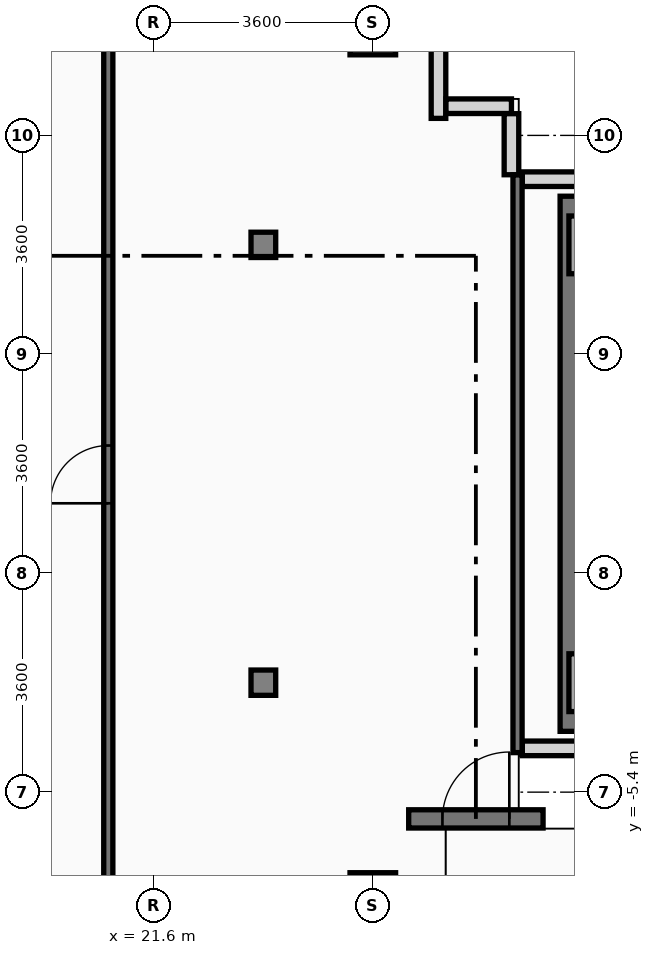
"""IFC4 building model, lengths in metres.
Left out: names, types, materials, properties, quantities, classifications, styles, units other than length and angle.
Written with IfcOpenShell. Run it as: python <this file> out.ifc"""

import sys

from ifc_helpers import new_model, si_unit, direction, frame, frame_2d, origin, origin_2d, place, context, subcontext, project, spatial, rectangle, i_section, extrude, source, transform, mapped, element, fill, save


model = new_model("IFC4")
c1 = context("Model", 3, precision=1e-05, world=origin(), true_north=direction((0.0, 1.0)))
c2 = subcontext(c1, "Body", "Model", "MODEL_VIEW")
j1 = project(units=[si_unit("LENGTHUNIT", "METRE"), si_unit("PLANEANGLEUNIT", "RADIAN")], contexts=[c1])
p1 = place(None, origin())
s1 = spatial("IfcSite", under=j1, at=p1, CompositionType="ELEMENT")
p2 = place(p1, origin())
s2 = spatial("IfcBuilding", under=s1, at=p2, CompositionType="ELEMENT")
p3 = place(p2, frame((0.0, 0.0, 25.2)))
s3 = spatial("IfcBuildingStorey", under=s2, at=p3, CompositionType="ELEMENT", Elevation=25.2)
m1 = source(origin(), c2, "Body", "SweptSolid", [
    extrude(i_section(OverallWidth=0.406, OverallDepth=0.416, WebThickness=0.024, FlangeThickness=0.039, at=origin_2d()), origin(), (0.0, 0.0, 1.0), 5.2),
])
for number, where, z_axis, x_axis in (
    (1, (23.4, -3.6, 0.0), (0.0, 0.0, 1.0), (1.0, 0.0, 0.0)),
    (2, (23.4, 3.6, 0.0), (0.0, 0.0, 1.0), (1.0, 0.0, 0.0)),
):
    element("IfcColumn", number, at=place(p3, frame(where, z_axis=z_axis, x_axis=x_axis)), inside=s3, PredefinedType="COLUMN", context=c2, shape_type="MappedRepresentation", body=[
        mapped(m1, transform((0.0, 0.0, 0.0), x_axis=(1.0, 0.0, 0.0), y_axis=(0.0, 1.0, 0.0), z_axis=(0.0, 0.0, 1.0), scale=1.0)),
    ])
m2 = source(origin(), c2, "Body", "SweptSolid", [
    extrude(rectangle(XDim=0.75, YDim=0.95, at=origin_2d()), origin(), (0.0, 0.0, 1.0), 5.2),
])
for number, where, z_axis, x_axis in (
    (3, (25.2, -7.2, 0.0), (0.0, 0.0, 1.0), (1.0, 0.0, 0.0)),
    (4, (25.2, 7.2, 0.0), (0.0, 0.0, 1.0), (1.0, 0.0, 0.0)),
    (5, (28.8, -3.6, 0.0), (0.0, 0.0, 1.0), (1.0, 0.0, 0.0)),
    (6, (28.8, 3.6, 0.0), (0.0, 0.0, 1.0), (1.0, 0.0, 0.0)),
):
    element("IfcColumn", number, at=place(p3, frame(where, z_axis=z_axis, x_axis=x_axis)), inside=s3, PredefinedType="COLUMN", context=c2, shape_type="MappedRepresentation", body=[
        mapped(m2, transform((0.0, 0.0, 0.0), x_axis=(1.0, 0.0, 0.0), y_axis=(0.0, 1.0, 0.0), z_axis=(0.0, 0.0, 1.0), scale=1.0)),
    ])
p4 = place(p3, frame((28.45, -4.4, 0.0), z_axis=(0.0, 0.0, 1.0), x_axis=(0.0, 1.0, 0.0)))
e7 = element("IfcWall", 7, at=p4, inside=s3, PredefinedType="SOLIDWALL", context=c2, shape_type="SweptSolid", body=[
    extrude(rectangle(XDim=8.8, YDim=0.34, at=frame_2d((4.4, 0.0))), origin(), (0.0, 0.0, 1.0), 4.386),
])
p5 = place(p3, frame((25.79, -5.84, 0.0), z_axis=(0.0, 0.0, 1.0), x_axis=(1.0, 0.0, 0.0)))
e8 = element("IfcWall", 8, at=p5, inside=s3, PredefinedType="SOLIDWALL", context=c2, shape_type="SweptSolid", body=[
    extrude(rectangle(XDim=2.21, YDim=0.3, at=frame_2d((1.105, 0.0))), origin(), (0.0, 0.0, 1.0), 3.4),
])
p6 = place(p5, frame((0.555, 0.0, 0.0)))
e9 = element("IfcOpeningElement", 9, at=p6, cuts=e8, PredefinedType="OPENING", context=c2, shape_type="SweptSolid", body=[
    extrude(rectangle(XDim=1.1, YDim=2.3, at=frame_2d((0.55, 1.15))), frame((0.0, 0.16, 0.0), z_axis=(0.0, -1.0, 0.0), x_axis=(1.0, 0.0, 0.0)), (0.0, 0.0, 1.0), 0.32),
])
p7 = place(p3, frame((28.68, -4.68, 0.0), z_axis=(0.0, 0.0, 1.0), x_axis=(-1.0, 0.0, 0.0)))
e10 = element("IfcWall", 10, at=p7, inside=s3, PredefinedType="PARAPET", context=c2, shape_type="SweptSolid", body=[
    extrude(rectangle(XDim=1.022, YDim=0.24, at=frame_2d((0.511, 0.0))), origin(), (0.0, 0.0, 1.0), 1.15),
])
p8 = place(p3, frame((26.28, 6.957, 0.0), z_axis=(0.0, 0.0, 1.0), x_axis=(0.0, -1.0, 0.0)))
e11 = element("IfcWall", 11, at=p8, inside=s3, PredefinedType="PARAPET", context=c2, shape_type="SweptSolid", body=[
    extrude(rectangle(XDim=1.277, YDim=0.24, at=frame_2d((0.639, 0.0))), origin(), (0.0, 0.0, 1.0), 1.15),
])
p9 = place(p3, frame((26.403, 5.88, 0.0), z_axis=(0.0, 0.0, 1.0), x_axis=(1.0, 0.0, 0.0)))
e12 = element("IfcWall", 12, at=p9, inside=s3, PredefinedType="PARAPET", context=c2, shape_type="SweptSolid", body=[
    extrude(rectangle(XDim=1.077, YDim=0.24, at=frame_2d((0.539, 0.0))), origin(), (0.0, 0.0, 1.0), 1.15),
])
p10 = place(p3, frame((27.48, 5.757, 0.0), z_axis=(0.0, 0.0, 1.0), x_axis=(0.0, -1.0, 0.0)))
e13 = element("IfcWall", 13, at=p10, inside=s3, PredefinedType="PARAPET", context=c2, shape_type="SweptSolid", body=[
    extrude(rectangle(XDim=1.004, YDim=0.24, at=frame_2d((0.502, 0.0))), origin(), (0.0, 0.0, 1.0), 1.15),
])
p11 = place(p3, frame((27.658, 4.68, 0.0), z_axis=(0.0, 0.0, 1.0), x_axis=(1.0, 0.0, 0.0)))
e14 = element("IfcWall", 14, at=p11, inside=s3, PredefinedType="PARAPET", context=c2, shape_type="SweptSolid", body=[
    extrude(rectangle(XDim=1.022, YDim=0.24, at=frame_2d((0.511, 0.0))), origin(), (0.0, 0.0, 1.0), 1.15),
])
p12 = place(p3, frame((27.58, -4.75, 0.0), z_axis=(0.0, 0.0, 1.0), x_axis=(0.0, 1.0, 0.0)))
e15 = element("IfcWall", 15, at=p12, inside=s3, PredefinedType="PARTITIONING", context=c2, shape_type="SweptSolid", body=[
    extrude(rectangle(XDim=9.5, YDim=0.15, at=frame_2d((4.75, 0.0))), origin(), (0.0, 0.0, 1.0), 4.386),
])
p13 = place(p3, frame((20.85, -6.85, 0.0), z_axis=(0.0, 0.0, 1.0), x_axis=(0.0, 1.0, 0.0)))
e16 = element("IfcWall", 16, at=p13, inside=s3, PredefinedType="PARTITIONING", context=c2, shape_type="SweptSolid", body=[
    extrude(rectangle(XDim=13.7, YDim=0.15, at=frame_2d((6.85, 0.0))), origin(), (0.0, 0.0, 1.0), 3.4),
])
p14 = place(p13, frame((6.2, 0.0, 0.0)))
e17 = element("IfcOpeningElement", 17, at=p14, cuts=e16, PredefinedType="OPENING", context=c2, shape_type="SweptSolid", body=[
    extrude(rectangle(XDim=0.95, YDim=2.15, at=frame_2d((0.475, 1.075))), frame((0.0, 0.085, 0.0), z_axis=(0.0, -1.0, 0.0), x_axis=(1.0, 0.0, 0.0)), (0.0, 0.0, 1.0), 0.17),
])
m3 = source(origin(), c2, "Body", "SweptSolid", [
    extrude(rectangle(XDim=1.1, YDim=2.3, at=frame_2d((0.55, 1.15))), frame((0.0, 0.025, 0.0), z_axis=(0.0, -1.0, 0.0), x_axis=(1.0, 0.0, 0.0)), (0.0, 0.0, 1.0), 0.05),
])
p15 = place(p6, frame((1.1, 0.0, 0.0), z_axis=(0.0, 0.0, 1.0), x_axis=(-1.0, 0.0, 0.0)))
e18 = element("IfcDoor", 18, at=p15, inside=s3, OperationType="SINGLE_SWING_RIGHT", PredefinedType="DOOR", context=c2, shape_type="MappedRepresentation", body=[
    mapped(m3, transform((0.0, 0.0, 0.0), x_axis=(1.0, 0.0, 0.0), y_axis=(0.0, 1.0, 0.0), z_axis=(0.0, 0.0, 1.0), scale=1.0)),
])
fill(e9, e18)
m4 = source(origin(), c2, "Body", "SweptSolid", [
    extrude(rectangle(XDim=0.95, YDim=2.15, at=frame_2d((0.475, 1.075))), frame((0.0, 0.025, 0.0), z_axis=(0.0, -1.0, 0.0), x_axis=(1.0, 0.0, 0.0)), (0.0, 0.0, 1.0), 0.05),
])
p16 = place(p14, origin())
e19 = element("IfcDoor", 19, at=p16, inside=s3, OperationType="SINGLE_SWING_LEFT", PredefinedType="DOOR", context=c2, shape_type="MappedRepresentation", body=[
    mapped(m4, transform((0.0, 0.0, 0.0), x_axis=(1.0, 0.0, 0.0), y_axis=(0.0, 1.0, 0.0), z_axis=(0.0, 0.0, 1.0), scale=1.0)),
])
fill(e17, e19)
save(model, sys.argv[1])
